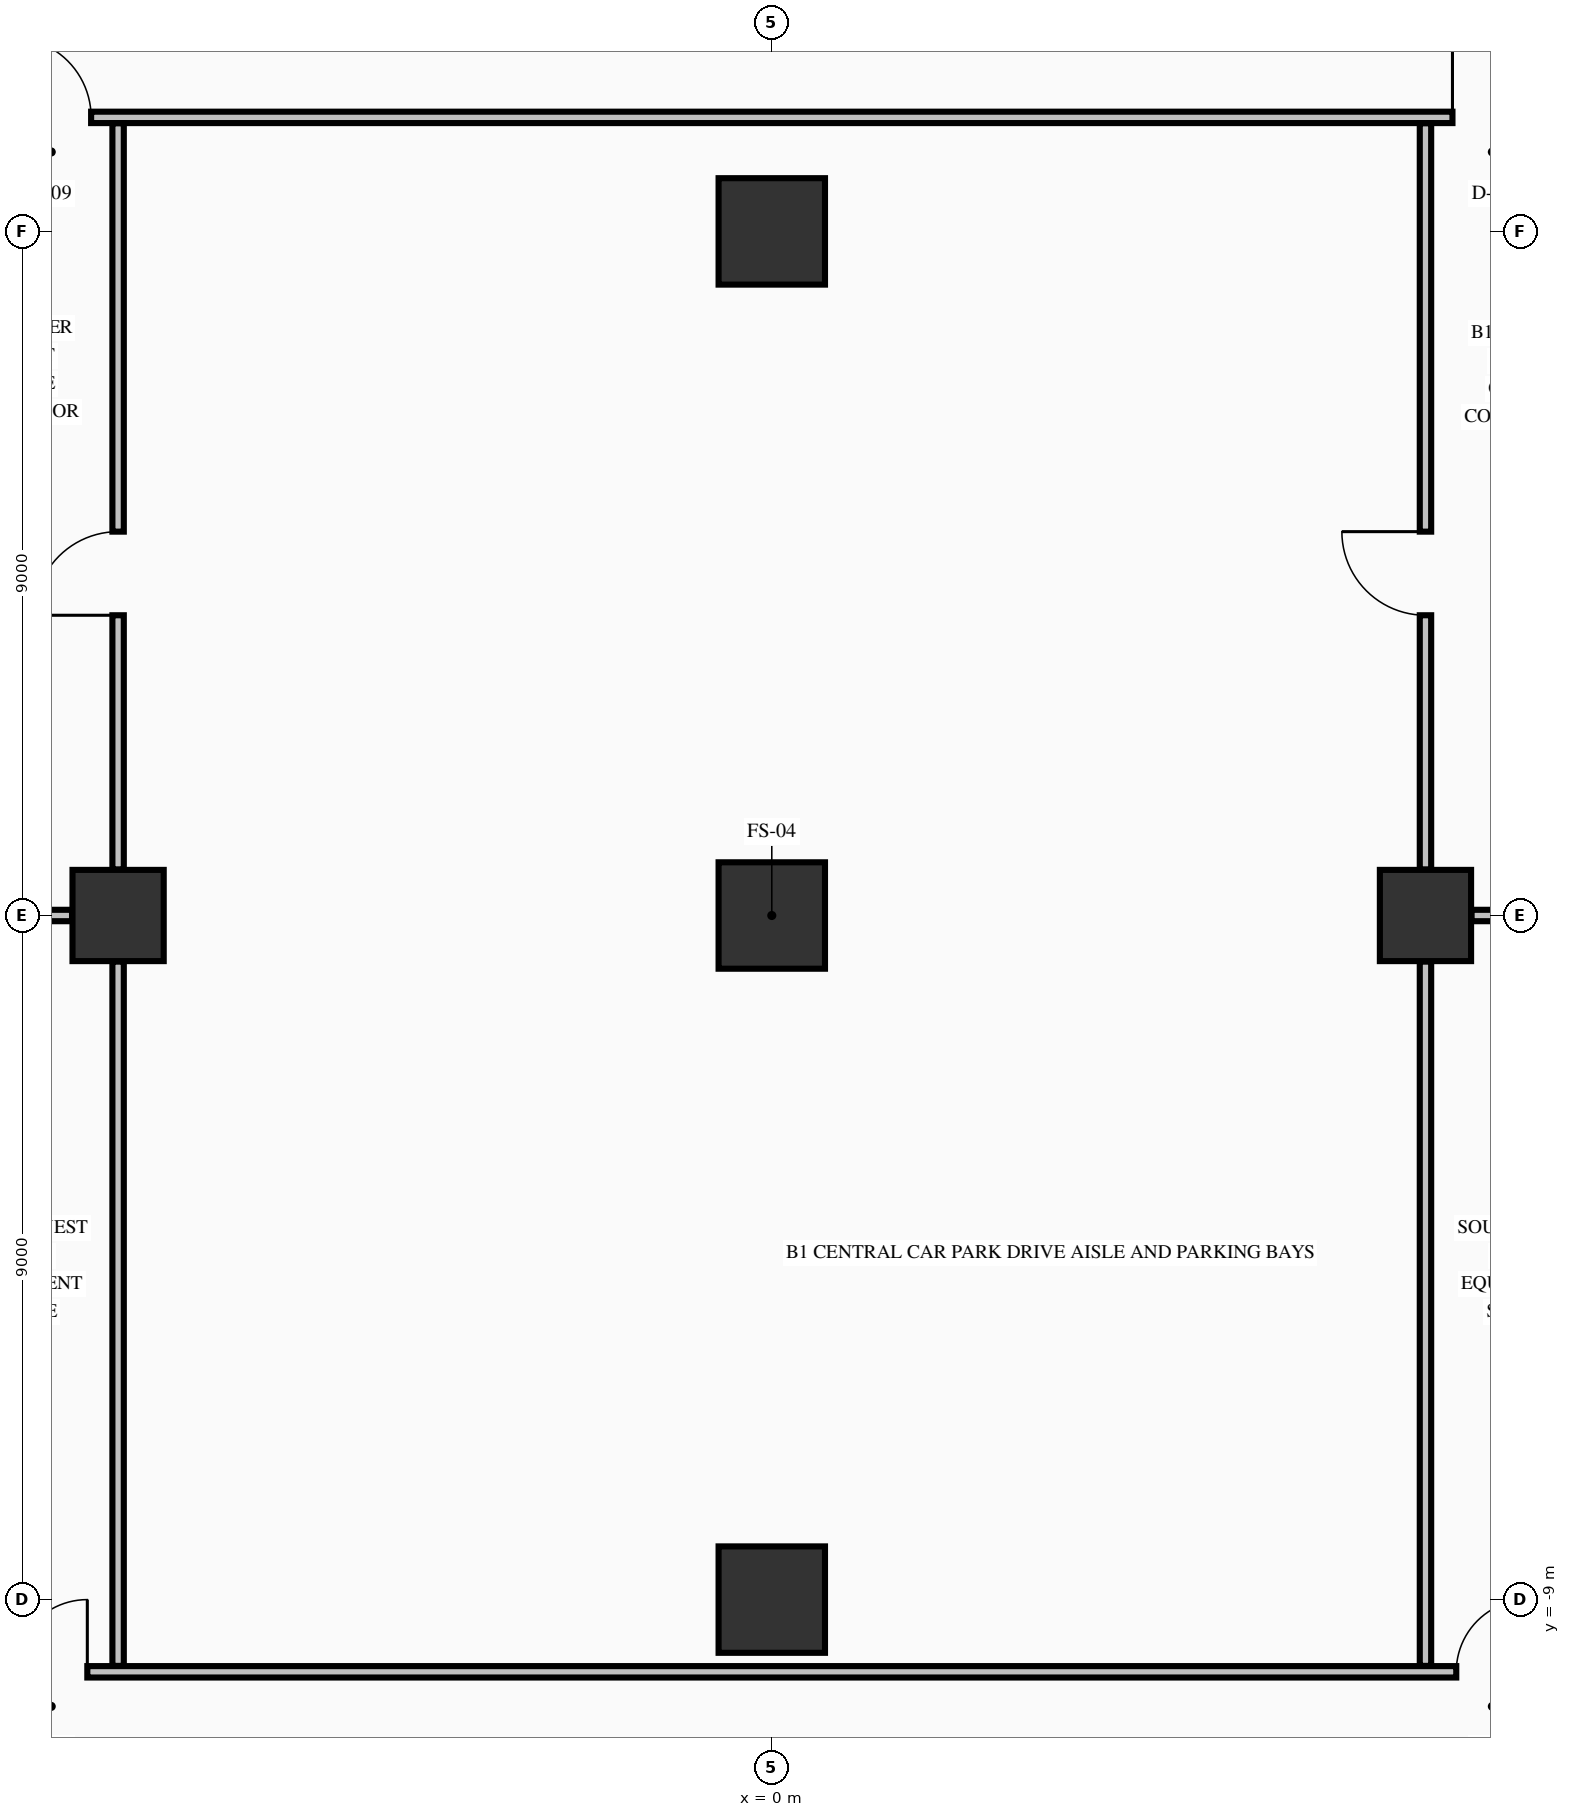
"""IFC4 building model, lengths in metres.
Left out: names, types, materials, properties, quantities, classifications, styles, units other than length and angle.
Written with IfcOpenShell. Run it as: python <this file> out.ifc"""

import sys

from ifc_helpers import new_model, si_unit, direction, frame, frame_2d, origin, origin_2d, place, context, subcontext, project, spatial, rectangle, extrude, element, fill, save


model = new_model("IFC4")
c1 = context("Model", 3, precision=1e-05, world=origin(), true_north=direction((0.0, 1.0)))
c2 = subcontext(c1, "Body", "Model", "MODEL_VIEW")
j1 = project(units=[si_unit("LENGTHUNIT", "METRE"), si_unit("PLANEANGLEUNIT", "RADIAN")], contexts=[c1])
p1 = place(None, origin())
s1 = spatial("IfcSite", under=j1, at=p1, CompositionType="ELEMENT")
p2 = place(p1, origin())
s2 = spatial("IfcBuilding", under=s1, at=p2, CompositionType="ELEMENT")
p3 = place(p2, frame((0.0, 0.0, -4.55)))
s3 = spatial("IfcBuildingStorey", under=s2, at=p3, CompositionType="ELEMENT", Elevation=-4.55)
for number, where, z_axis, x_axis in (
    (1, (0.0, -9.0, 0.0), (0.0, 0.0, 1.0), (1.0, 0.0, 0.0)),
    (2, (0.0, 0.0, 0.0), (0.0, 0.0, 1.0), (1.0, 0.0, 0.0)),
    (3, (0.0, 9.0, 0.0), (0.0, 0.0, 1.0), (1.0, 0.0, 0.0)),
):
    element("IfcColumn", number, at=place(p3, frame(where, z_axis=z_axis, x_axis=x_axis)), inside=s3, PredefinedType="COLUMN", context=c2, shape_type="SweptSolid", body=[
        extrude(rectangle(XDim=1.4, YDim=1.4, at=origin_2d()), origin(), (0.0, 0.0, 1.0), 4.2),
    ])
for number, where, z_axis, x_axis in (
    (4, (-8.6, 0.0, 0.0), (0.0, 0.0, 1.0), (1.0, 0.0, 0.0)),
    (5, (8.6, 0.0, 0.0), (0.0, 0.0, 1.0), (1.0, 0.0, 0.0)),
):
    element("IfcColumn", number, at=place(p3, frame(where, z_axis=z_axis, x_axis=x_axis)), inside=s3, PredefinedType="COLUMN", context=c2, shape_type="SweptSolid", body=[
        extrude(rectangle(XDim=1.2, YDim=1.2, at=origin_2d()), origin(), (0.0, 0.0, 1.0), 4.2),
    ])
p4 = place(p3, frame((-11.0, -9.95, 0.0), z_axis=(0.0, 0.0, 1.0), x_axis=(1.0, 0.0, 0.0)))
e6 = element("IfcWall", 6, at=p4, inside=s3, PredefinedType="PARTITIONING", context=c2, shape_type="SweptSolid", body=[
    extrude(rectangle(XDim=22.0, YDim=0.15, at=frame_2d((11.0, 0.0))), origin(), (0.0, 0.0, 1.0), 4.2),
])
p5 = place(p4, frame((1.045, 0.0, 0.0)))
e7 = element("IfcOpeningElement", 7, at=p5, cuts=e6, PredefinedType="OPENING", context=c2, shape_type="SweptSolid", body=[
    extrude(rectangle(XDim=0.95, YDim=2.15, at=frame_2d((0.475, 1.075))), frame((0.0, 0.085, 0.0), z_axis=(0.0, -1.0, 0.0), x_axis=(1.0, 0.0, 0.0)), (0.0, 0.0, 1.0), 0.17),
])
p6 = place(p4, frame((20.005, 0.0, 0.0)))
e8 = element("IfcOpeningElement", 8, at=p6, cuts=e6, PredefinedType="OPENING", context=c2, shape_type="SweptSolid", body=[
    extrude(rectangle(XDim=0.95, YDim=2.15, at=frame_2d((0.475, 1.075))), frame((0.0, 0.085, 0.0), z_axis=(0.0, -1.0, 0.0), x_axis=(1.0, 0.0, 0.0)), (0.0, 0.0, 1.0), 0.17),
])
for number, where, z_axis, x_axis in (
    (9, (-10.194, 0.0, 0.0), (0.0, 0.0, 1.0), (1.0, 0.0, 0.0)),
    (10, (9.206, 0.0, 0.0), (0.0, 0.0, 1.0), (1.0, 0.0, 0.0)),
):
    element("IfcWall", number, at=place(p3, frame(where, z_axis=z_axis, x_axis=x_axis)), inside=s3, PredefinedType="PARTITIONING", context=c2, shape_type="SweptSolid", body=[
        extrude(rectangle(XDim=0.988, YDim=0.15, at=frame_2d((0.494, 0.0))), origin(), (0.0, 0.0, 1.0), 3.242),
    ])
p7 = place(p3, frame((-11.0, 10.5, 0.0), z_axis=(0.0, 0.0, 1.0), x_axis=(1.0, 0.0, 0.0)))
e11 = element("IfcWall", 11, at=p7, inside=s3, PredefinedType="PARTITIONING", context=c2, shape_type="SweptSolid", body=[
    extrude(rectangle(XDim=22.0, YDim=0.15, at=frame_2d((11.0, 0.0))), origin(), (0.0, 0.0, 1.0), 4.2),
])
p8 = place(p7, frame((0.995, 0.0, 0.0)))
e12 = element("IfcOpeningElement", 12, at=p8, cuts=e11, PredefinedType="OPENING", context=c2, shape_type="SweptSolid", body=[
    extrude(rectangle(XDim=1.05, YDim=2.15, at=frame_2d((0.525, 1.075))), frame((0.0, 0.085, 0.0), z_axis=(0.0, -1.0, 0.0), x_axis=(1.0, 0.0, 0.0)), (0.0, 0.0, 1.0), 0.17),
])
p9 = place(p7, frame((19.955, 0.0, 0.0)))
e13 = element("IfcOpeningElement", 13, at=p9, cuts=e11, PredefinedType="OPENING", context=c2, shape_type="SweptSolid", body=[
    extrude(rectangle(XDim=1.05, YDim=2.15, at=frame_2d((0.525, 1.075))), frame((0.0, 0.085, 0.0), z_axis=(0.0, -1.0, 0.0), x_axis=(1.0, 0.0, 0.0)), (0.0, 0.0, 1.0), 0.17),
])
p10 = place(p3, frame((-8.6, -9.872, 0.0), z_axis=(0.0, 0.0, 1.0), x_axis=(0.0, 1.0, 0.0)))
e14 = element("IfcWall", 14, at=p10, inside=s3, PredefinedType="PARTITIONING", context=c2, shape_type="SweptSolid", body=[
    extrude(rectangle(XDim=9.266, YDim=0.15, at=frame_2d((4.633, 0.0))), origin(), (0.0, 0.0, 1.0), 3.242),
])
p11 = place(p3, frame((-8.6, 0.606, 0.0), z_axis=(0.0, 0.0, 1.0), x_axis=(0.0, 1.0, 0.0)))
e15 = element("IfcWall", 15, at=p11, inside=s3, PredefinedType="PARTITIONING", context=c2, shape_type="SweptSolid", body=[
    extrude(rectangle(XDim=9.816, YDim=0.15, at=frame_2d((4.908, 0.0))), origin(), (0.0, 0.0, 1.0), 3.242),
])
p12 = place(p11, frame((3.344, 0.0, 0.0)))
e16 = element("IfcOpeningElement", 16, at=p12, cuts=e15, PredefinedType="OPENING", context=c2, shape_type="SweptSolid", body=[
    extrude(rectangle(XDim=1.1, YDim=2.15, at=frame_2d((0.55, 1.075))), frame((0.0, 0.085, 0.0), z_axis=(0.0, -1.0, 0.0), x_axis=(1.0, 0.0, 0.0)), (0.0, 0.0, 1.0), 0.17),
])
p13 = place(p3, frame((8.6, -9.872, 0.0), z_axis=(0.0, 0.0, 1.0), x_axis=(0.0, 1.0, 0.0)))
e17 = element("IfcWall", 17, at=p13, inside=s3, PredefinedType="PARTITIONING", context=c2, shape_type="SweptSolid", body=[
    extrude(rectangle(XDim=9.266, YDim=0.15, at=frame_2d((4.633, 0.0))), origin(), (0.0, 0.0, 1.0), 3.242),
])
p14 = place(p3, frame((8.6, 0.606, 0.0), z_axis=(0.0, 0.0, 1.0), x_axis=(0.0, 1.0, 0.0)))
e18 = element("IfcWall", 18, at=p14, inside=s3, PredefinedType="PARTITIONING", context=c2, shape_type="SweptSolid", body=[
    extrude(rectangle(XDim=9.816, YDim=0.15, at=frame_2d((4.908, 0.0))), origin(), (0.0, 0.0, 1.0), 3.242),
])
p15 = place(p14, frame((3.344, 0.0, 0.0)))
e19 = element("IfcOpeningElement", 19, at=p15, cuts=e18, PredefinedType="OPENING", context=c2, shape_type="SweptSolid", body=[
    extrude(rectangle(XDim=1.1, YDim=2.15, at=frame_2d((0.55, 1.075))), frame((0.0, 0.085, 0.0), z_axis=(0.0, -1.0, 0.0), x_axis=(1.0, 0.0, 0.0)), (0.0, 0.0, 1.0), 0.17),
])
p16 = place(p8, origin())
e20 = element("IfcDoor", 20, at=p16, inside=s3, OperationType="SINGLE_SWING_LEFT", PredefinedType="DOOR", context=c2, shape_type="SweptSolid", body=[
    extrude(rectangle(XDim=1.05, YDim=2.15, at=frame_2d((0.525, 1.075))), frame((0.0, 0.025, 0.0), z_axis=(0.0, -1.0, 0.0), x_axis=(1.0, 0.0, 0.0)), (0.0, 0.0, 1.0), 0.05),
])
fill(e12, e20)
p17 = place(p5, origin())
e21 = element("IfcDoor", 21, at=p17, inside=s3, OperationType="SINGLE_SWING_RIGHT", PredefinedType="DOOR", context=c2, shape_type="SweptSolid", body=[
    extrude(rectangle(XDim=0.95, YDim=2.15, at=frame_2d((0.475, 1.075))), frame((0.0, 0.025, 0.0), z_axis=(0.0, -1.0, 0.0), x_axis=(1.0, 0.0, 0.0)), (0.0, 0.0, 1.0), 0.05),
])
fill(e7, e21)
p18 = place(p9, origin())
e22 = element("IfcDoor", 22, at=p18, inside=s3, OperationType="SINGLE_SWING_LEFT", PredefinedType="DOOR", context=c2, shape_type="SweptSolid", body=[
    extrude(rectangle(XDim=1.05, YDim=2.15, at=frame_2d((0.525, 1.075))), frame((0.0, 0.025, 0.0), z_axis=(0.0, -1.0, 0.0), x_axis=(1.0, 0.0, 0.0)), (0.0, 0.0, 1.0), 0.05),
])
fill(e13, e22)
p19 = place(p6, origin())
e23 = element("IfcDoor", 23, at=p19, inside=s3, OperationType="SINGLE_SWING_RIGHT", PredefinedType="DOOR", context=c2, shape_type="SweptSolid", body=[
    extrude(rectangle(XDim=0.95, YDim=2.15, at=frame_2d((0.475, 1.075))), frame((0.0, 0.025, 0.0), z_axis=(0.0, -1.0, 0.0), x_axis=(1.0, 0.0, 0.0)), (0.0, 0.0, 1.0), 0.05),
])
fill(e8, e23)
p20 = place(p12, origin())
e24 = element("IfcDoor", 24, at=p20, inside=s3, OperationType="SINGLE_SWING_LEFT", PredefinedType="DOOR", context=c2, shape_type="SweptSolid", body=[
    extrude(rectangle(XDim=1.1, YDim=2.15, at=frame_2d((0.55, 1.075))), frame((0.0, 0.025, 0.0), z_axis=(0.0, -1.0, 0.0), x_axis=(1.0, 0.0, 0.0)), (0.0, 0.0, 1.0), 0.05),
])
fill(e16, e24)
p21 = place(p15, origin())
e25 = element("IfcDoor", 25, at=p21, inside=s3, OperationType="SINGLE_SWING_RIGHT", PredefinedType="DOOR", context=c2, shape_type="SweptSolid", body=[
    extrude(rectangle(XDim=1.1, YDim=2.15, at=frame_2d((0.55, 1.075))), frame((0.0, 0.025, 0.0), z_axis=(0.0, -1.0, 0.0), x_axis=(1.0, 0.0, 0.0)), (0.0, 0.0, 1.0), 0.05),
])
fill(e19, e25)
save(model, sys.argv[1])
